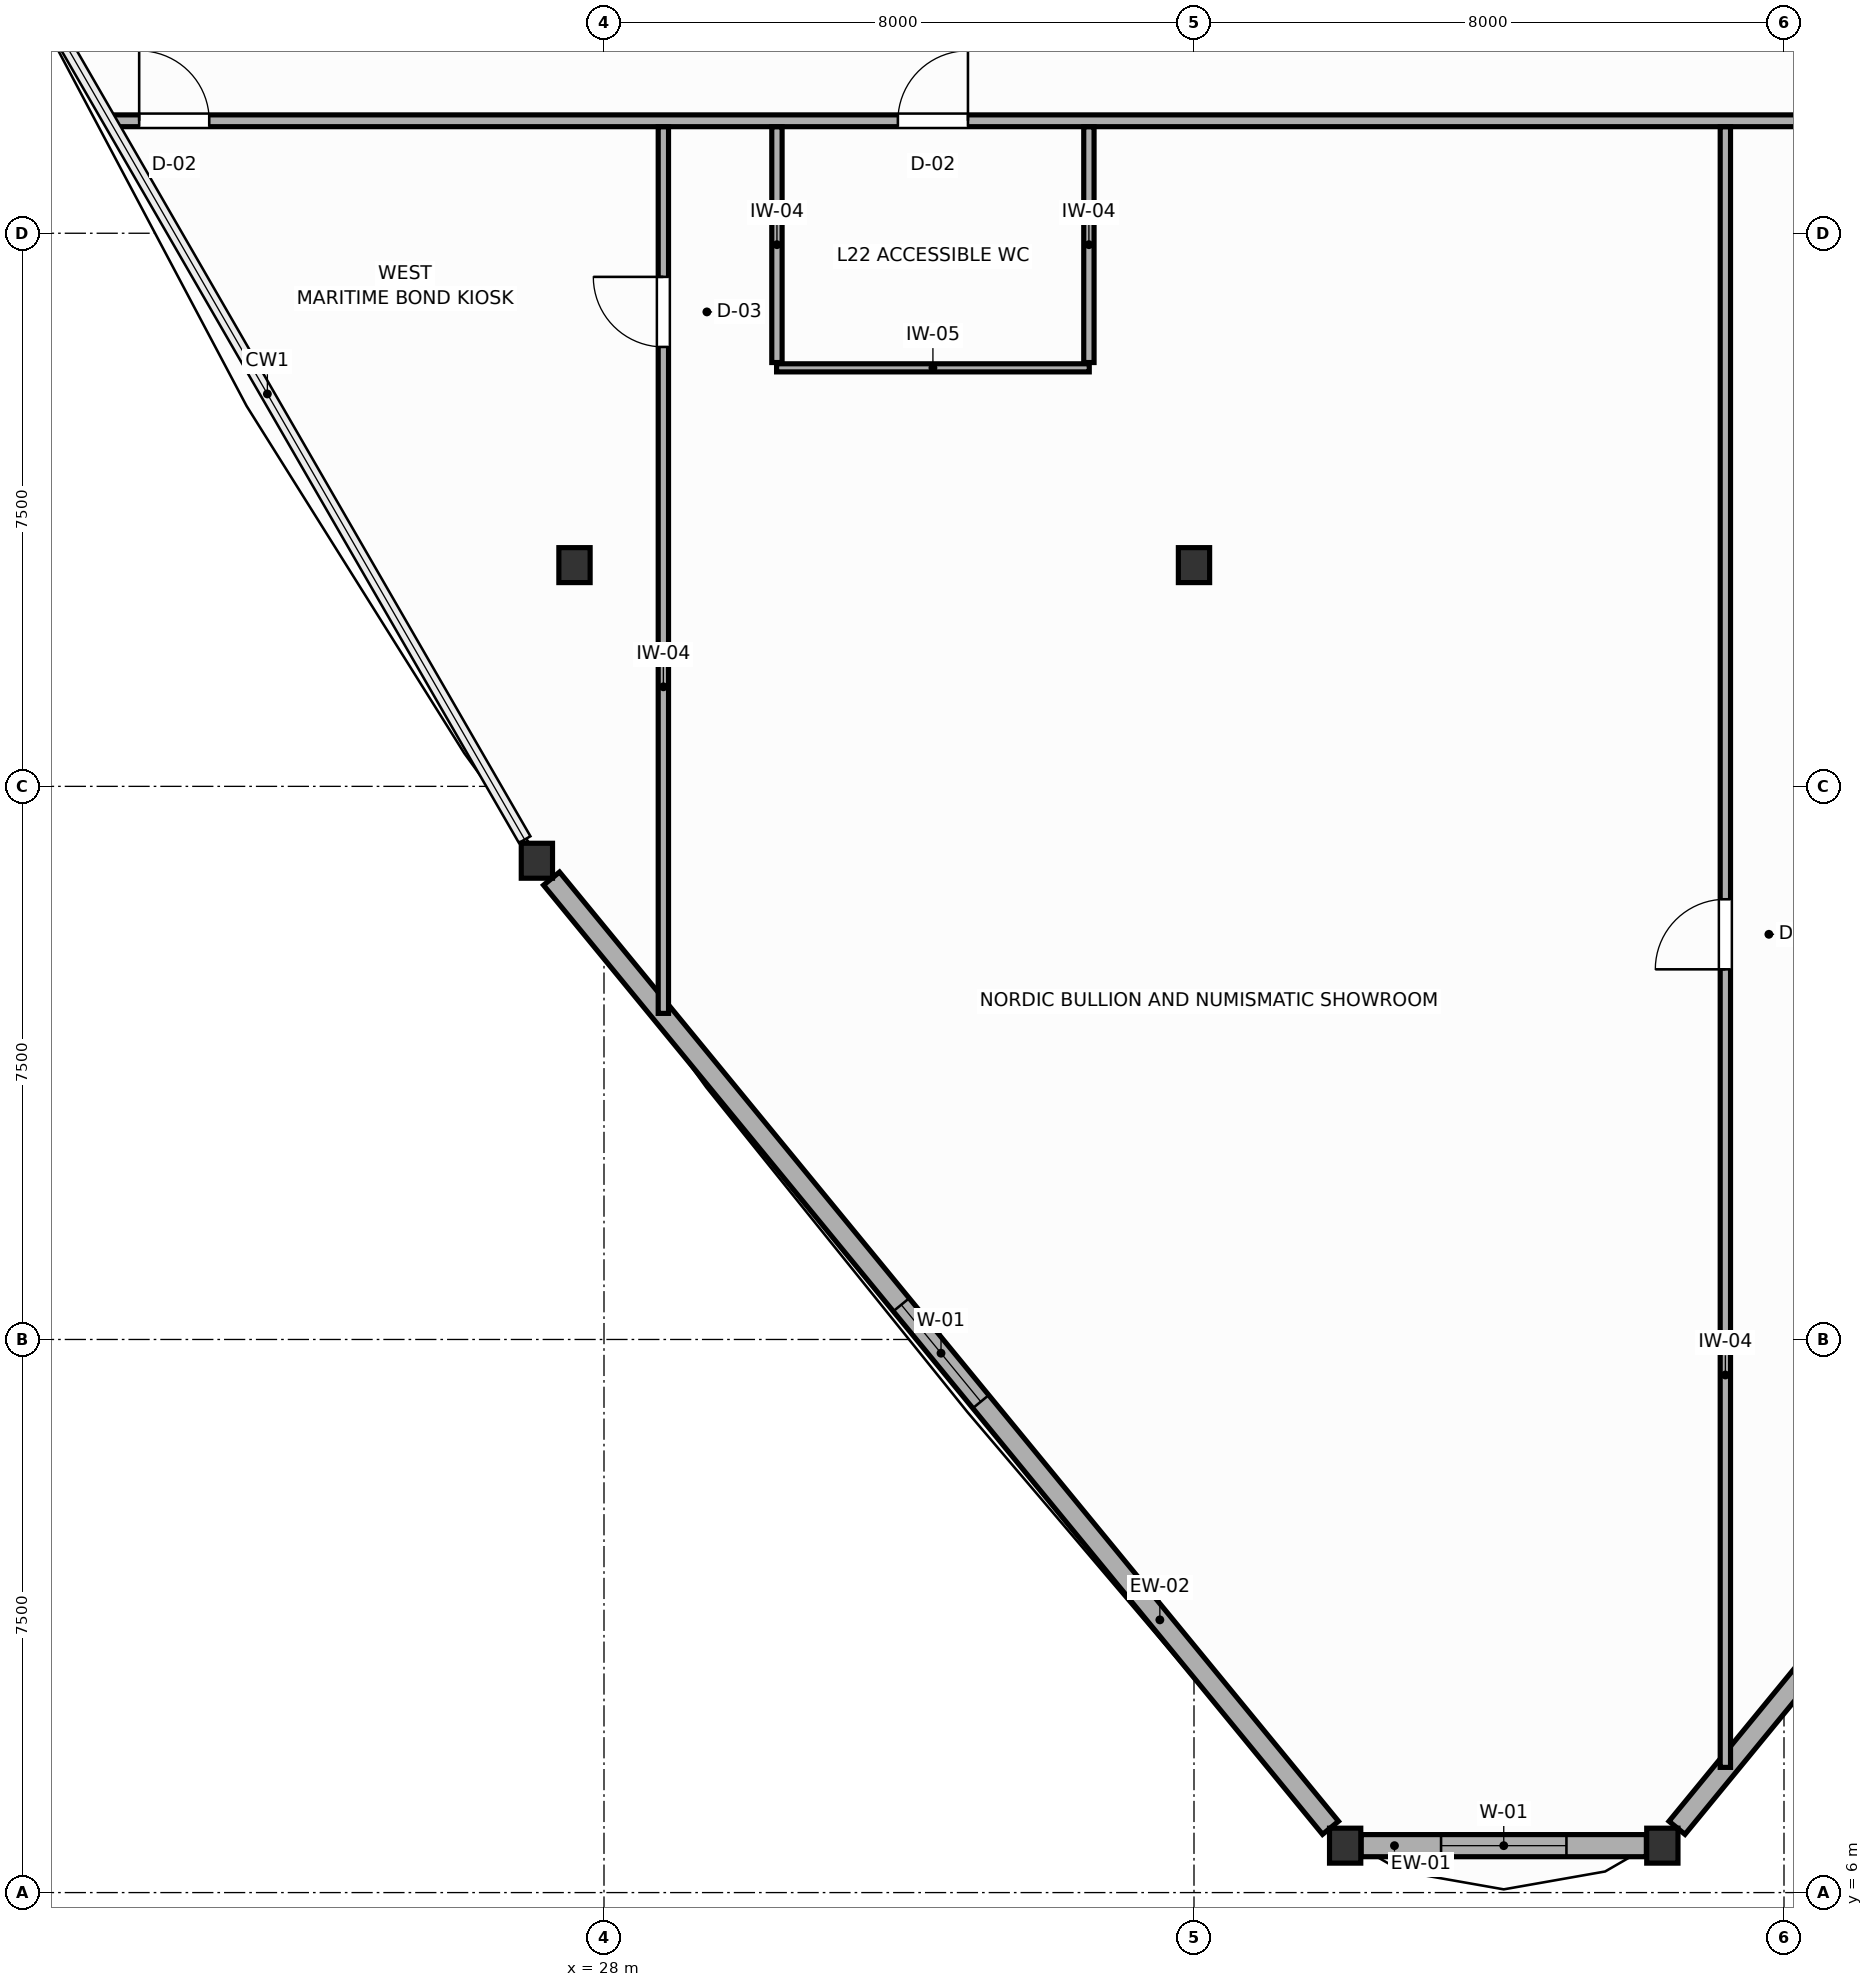
"""IFC4 building model, lengths in metres.
Left out: names, types, materials, properties, quantities, classifications, styles, units other than length and angle.
Written with IfcOpenShell. Run it as: python <this file> out.ifc"""

import sys

from ifc_helpers import new_model, si_unit, direction, frame, frame_2d, origin, origin_2d, place, context, subcontext, project, spatial, rectangle, i_section, extrude, source, transform, mapped, element, fill, save


model = new_model("IFC4")
c1 = context("Model", 3, precision=1e-05, world=origin(), true_north=direction((0.0, 1.0)))
c2 = subcontext(c1, "Body", "Model", "MODEL_VIEW")
j1 = project(units=[si_unit("LENGTHUNIT", "METRE"), si_unit("PLANEANGLEUNIT", "RADIAN")], contexts=[c1])
p1 = place(None, origin())
s1 = spatial("IfcSite", under=j1, at=p1, CompositionType="ELEMENT")
p2 = place(p1, origin())
s2 = spatial("IfcBuilding", under=s1, at=p2, CompositionType="ELEMENT")
p3 = place(p2, frame((0.0, 0.0, 91.2)))
s3 = spatial("IfcBuildingStorey", under=s2, at=p3, CompositionType="ELEMENT", Elevation=91.2)
m1 = source(origin(), c2, "Body", "SweptSolid", [
    extrude(i_section(OverallWidth=0.424, OverallDepth=0.474, WebThickness=0.045, FlangeThickness=0.072, FilletRadius=0.015, at=origin_2d()), origin(), (0.0, 0.0, 1.0), 3.9),
])
for number, where, z_axis, x_axis in (
    (1, (27.6, 24.0, 0.0), (0.0, 0.0, 1.0), (1.0, 0.0, 0.0)),
    (2, (36.0, 24.0, 0.0), (0.0, 0.0, 1.0), (1.0, 0.0, 0.0)),
    (3, (27.09, 19.991, 0.0), (0.0, 0.0, 1.0), (1.0, 0.0, 0.0)),
    (4, (38.05, 6.636, 0.0), (0.0, 0.0, 1.0), (1.0, 0.0, 0.0)),
    (5, (42.351, 6.636, 0.0), (0.0, 0.0, 1.0), (1.0, 0.0, 0.0)),
):
    element("IfcColumn", number, at=place(p3, frame(where, z_axis=z_axis, x_axis=x_axis)), inside=s3, PredefinedType="COLUMN", context=c2, shape_type="MappedRepresentation", body=[
        mapped(m1, transform((0.0, 0.0, 0.0), scale=1.0)),
    ])
p4 = place(p3, frame((27.289, 19.749, 0.0), z_axis=(0.0, 0.0, 1.0), x_axis=(0.634363798099, -0.77303465101, 0.0)))
e6 = element("IfcWall", 6, at=p4, inside=s3, PredefinedType="SOLIDWALL", context=c2, shape_type="SweptSolid", body=[
    extrude(rectangle(XDim=16.65, YDim=0.28, at=frame_2d((8.325, 0.0))), origin(), (0.0, 0.0, 1.0), 3.23),
])
p5 = place(p4, frame((7.475, 0.0, 0.75)))
e7 = element("IfcOpeningElement", 7, at=p5, cuts=e6, PredefinedType="OPENING", context=c2, shape_type="SweptSolid", body=[
    extrude(rectangle(XDim=1.7, YDim=1.75, at=frame_2d((0.85, 0.875))), frame((0.0, 0.15, 0.0), z_axis=(0.0, -1.0, 0.0), x_axis=(1.0, 0.0, 0.0)), (0.0, 0.0, 1.0), 0.3),
])
p6 = place(p3, frame((38.267, 6.636, 0.0), z_axis=(0.0, 0.0, 1.0), x_axis=(1.0, 0.0, 0.0)))
e8 = element("IfcWall", 8, at=p6, inside=s3, PredefinedType="SOLIDWALL", context=c2, shape_type="SweptSolid", body=[
    extrude(rectangle(XDim=3.867, YDim=0.3, at=frame_2d((1.934, 0.0))), origin(), (0.0, 0.0, 1.0), 3.23),
])
p7 = place(p6, frame((1.083, 0.0, 0.75)))
e9 = element("IfcOpeningElement", 9, at=p7, cuts=e8, PredefinedType="OPENING", context=c2, shape_type="SweptSolid", body=[
    extrude(rectangle(XDim=1.7, YDim=1.75, at=frame_2d((0.85, 0.875))), frame((0.0, 0.16, 0.0), z_axis=(0.0, -1.0, 0.0), x_axis=(1.0, 0.0, 0.0)), (0.0, 0.0, 1.0), 0.32),
])
p8 = place(p3, frame((42.549, 6.878, 0.0), z_axis=(0.0, 0.0, 1.0), x_axis=(0.634372560511, 0.77302746036, 0.0)))
e10 = element("IfcWall", 10, at=p8, inside=s3, PredefinedType="SOLIDWALL", context=c2, shape_type="SweptSolid", body=[
    extrude(rectangle(XDim=16.65, YDim=0.28, at=frame_2d((8.325, 0.0))), origin(), (0.0, 0.0, 1.0), 3.23),
])
p9 = place(p8, frame((7.475, 0.0, 0.75)))
e11 = element("IfcOpeningElement", 11, at=p9, cuts=e10, PredefinedType="OPENING", context=c2, shape_type="SweptSolid", body=[
    extrude(rectangle(XDim=1.7, YDim=1.75, at=frame_2d((0.85, 0.875))), frame((0.0, 0.15, 0.0), z_axis=(0.0, -1.0, 0.0), x_axis=(1.0, 0.0, 0.0)), (0.0, 0.0, 1.0), 0.3),
])
p10 = place(p3, frame((21.317, 30.025, 0.0), z_axis=(0.0, 0.0, 1.0), x_axis=(1.0, 0.0, 0.0)))
e12 = element("IfcWall", 12, at=p10, inside=s3, PredefinedType="PARTITIONING", context=c2, shape_type="SweptSolid", body=[
    extrude(rectangle(XDim=37.766, YDim=0.16, at=frame_2d((18.883, 0.0))), origin(), (0.0, 0.0, 1.0), 3.68),
])
p11 = place(p10, frame((10.668, 0.0, 0.0)))
e13 = element("IfcOpeningElement", 13, at=p11, cuts=e12, PredefinedType="OPENING", context=c2, shape_type="SweptSolid", body=[
    extrude(rectangle(XDim=0.95, YDim=2.05, at=frame_2d((0.475, 1.025))), frame((0.0, 0.09, 0.0), z_axis=(0.0, -1.0, 0.0), x_axis=(1.0, 0.0, 0.0)), (0.0, 0.0, 1.0), 0.18),
])
p12 = place(p10, frame((0.38, 0.0, 0.0)))
e14 = element("IfcOpeningElement", 14, at=p12, cuts=e12, PredefinedType="OPENING", context=c2, shape_type="SweptSolid", body=[
    extrude(rectangle(XDim=0.95, YDim=2.05, at=frame_2d((0.475, 1.025))), frame((0.0, 0.09, 0.0), z_axis=(0.0, -1.0, 0.0), x_axis=(1.0, 0.0, 0.0)), (0.0, 0.0, 1.0), 0.18),
])
p13 = place(p3, frame((43.205, 7.698, 0.0), z_axis=(0.0, 0.0, 1.0), x_axis=(0.0, 1.0, 0.0)))
e15 = element("IfcWall", 15, at=p13, inside=s3, PredefinedType="PARTITIONING", context=c2, shape_type="SweptSolid", body=[
    extrude(rectangle(XDim=22.246, YDim=0.14, at=frame_2d((11.123, 0.0))), origin(), (0.0, 0.0, 1.0), 3.18),
])
p14 = place(p13, frame((10.821, 0.0, 0.0)))
e16 = element("IfcOpeningElement", 16, at=p14, cuts=e15, PredefinedType="OPENING", context=c2, shape_type="SweptSolid", body=[
    extrude(rectangle(XDim=0.95, YDim=2.05, at=frame_2d((0.475, 1.025))), frame((0.0, 0.08, 0.0), z_axis=(0.0, -1.0, 0.0), x_axis=(1.0, 0.0, 0.0)), (0.0, 0.0, 1.0), 0.16),
])
p15 = place(p3, frame((28.805, 17.921, 0.0), z_axis=(0.0, 0.0, 1.0), x_axis=(0.0, 1.0, 0.0)))
e17 = element("IfcWall", 17, at=p15, inside=s3, PredefinedType="PARTITIONING", context=c2, shape_type="SweptSolid", body=[
    extrude(rectangle(XDim=12.022, YDim=0.14, at=frame_2d((6.011, 0.0))), origin(), (0.0, 0.0, 1.0), 3.68),
])
p16 = place(p15, frame((9.037, 0.0, 0.0)))
e18 = element("IfcOpeningElement", 18, at=p16, cuts=e17, PredefinedType="OPENING", context=c2, shape_type="SweptSolid", body=[
    extrude(rectangle(XDim=0.95, YDim=2.05, at=frame_2d((0.475, 1.025))), frame((0.0, 0.08, 0.0), z_axis=(0.0, -1.0, 0.0), x_axis=(1.0, 0.0, 0.0)), (0.0, 0.0, 1.0), 0.16),
])
p17 = place(p3, frame((30.34, 26.675, 0.0), z_axis=(0.0, 0.0, 1.0), x_axis=(1.0, 0.0, 0.0)))
e19 = element("IfcWall", 19, at=p17, inside=s3, PredefinedType="MOVABLE", context=c2, shape_type="SweptSolid", body=[
    extrude(rectangle(XDim=4.24, YDim=0.11, at=frame_2d((2.12, 0.0))), origin(), (0.0, 0.0, 1.0), 3.68),
])
for number, where, z_axis, x_axis in (
    (20, (34.575, 26.747, 0.0), (0.0, 0.0, 1.0), (0.0, 1.0, 0.0)),
    (21, (30.345, 26.747, 0.0), (0.0, 0.0, 1.0), (0.0, 1.0, 0.0)),
):
    element("IfcWall", number, at=place(p3, frame(where, z_axis=z_axis, x_axis=x_axis)), inside=s3, PredefinedType="PARTITIONING", context=c2, shape_type="SweptSolid", body=[
        extrude(rectangle(XDim=3.196, YDim=0.14, at=frame_2d((1.598, 0.0))), origin(), (0.0, 0.0, 1.0), 3.68),
    ])
p18 = place(p5, origin())
e22 = element("IfcWindow", 22, at=p18, inside=s3, PartitioningType="SINGLE_PANEL", PredefinedType="WINDOW", context=c2, shape_type="SweptSolid", body=[
    extrude(rectangle(XDim=1.7, YDim=1.75, at=frame_2d((0.85, 0.875))), frame((0.0, 0.03, 0.0), z_axis=(0.0, -1.0, 0.0), x_axis=(1.0, 0.0, 0.0)), (0.0, 0.0, 1.0), 0.06),
])
fill(e7, e22)
p19 = place(p7, origin())
e23 = element("IfcWindow", 23, at=p19, inside=s3, PartitioningType="SINGLE_PANEL", PredefinedType="WINDOW", context=c2, shape_type="SweptSolid", body=[
    extrude(rectangle(XDim=1.7, YDim=1.75, at=frame_2d((0.85, 0.875))), frame((0.0, 0.03, 0.0), z_axis=(0.0, -1.0, 0.0), x_axis=(1.0, 0.0, 0.0)), (0.0, 0.0, 1.0), 0.06),
])
fill(e9, e23)
p20 = place(p11, origin())
e24 = element("IfcDoor", 24, at=p20, inside=s3, OperationType="SINGLE_SWING_RIGHT", PredefinedType="DOOR", context=c2, shape_type="SweptSolid", body=[
    extrude(rectangle(XDim=0.95, YDim=2.05, at=frame_2d((0.475, 1.025))), frame((0.0, 0.025, 0.0), z_axis=(0.0, -1.0, 0.0), x_axis=(1.0, 0.0, 0.0)), (0.0, 0.0, 1.0), 0.05),
])
fill(e13, e24)
p21 = place(p12, origin())
e25 = element("IfcDoor", 25, at=p21, inside=s3, OperationType="SINGLE_SWING_LEFT", PredefinedType="DOOR", context=c2, shape_type="SweptSolid", body=[
    extrude(rectangle(XDim=0.95, YDim=2.05, at=frame_2d((0.475, 1.025))), frame((0.0, 0.025, 0.0), z_axis=(0.0, -1.0, 0.0), x_axis=(1.0, 0.0, 0.0)), (0.0, 0.0, 1.0), 0.05),
])
fill(e14, e25)
p22 = place(p14, origin())
e26 = element("IfcDoor", 26, at=p22, inside=s3, OperationType="SINGLE_SWING_LEFT", PredefinedType="DOOR", context=c2, shape_type="SweptSolid", body=[
    extrude(rectangle(XDim=0.95, YDim=2.05, at=frame_2d((0.475, 1.025))), frame((0.0, 0.025, 0.0), z_axis=(0.0, -1.0, 0.0), x_axis=(1.0, 0.0, 0.0)), (0.0, 0.0, 1.0), 0.05),
])
fill(e16, e26)
p23 = place(p16, origin())
e27 = element("IfcDoor", 27, at=p23, inside=s3, OperationType="SINGLE_SWING_RIGHT", PredefinedType="DOOR", context=c2, shape_type="SweptSolid", body=[
    extrude(rectangle(XDim=0.95, YDim=2.05, at=frame_2d((0.475, 1.025))), frame((0.0, 0.025, 0.0), z_axis=(0.0, -1.0, 0.0), x_axis=(1.0, 0.0, 0.0)), (0.0, 0.0, 1.0), 0.05),
])
fill(e18, e27)
save(model, sys.argv[1])
